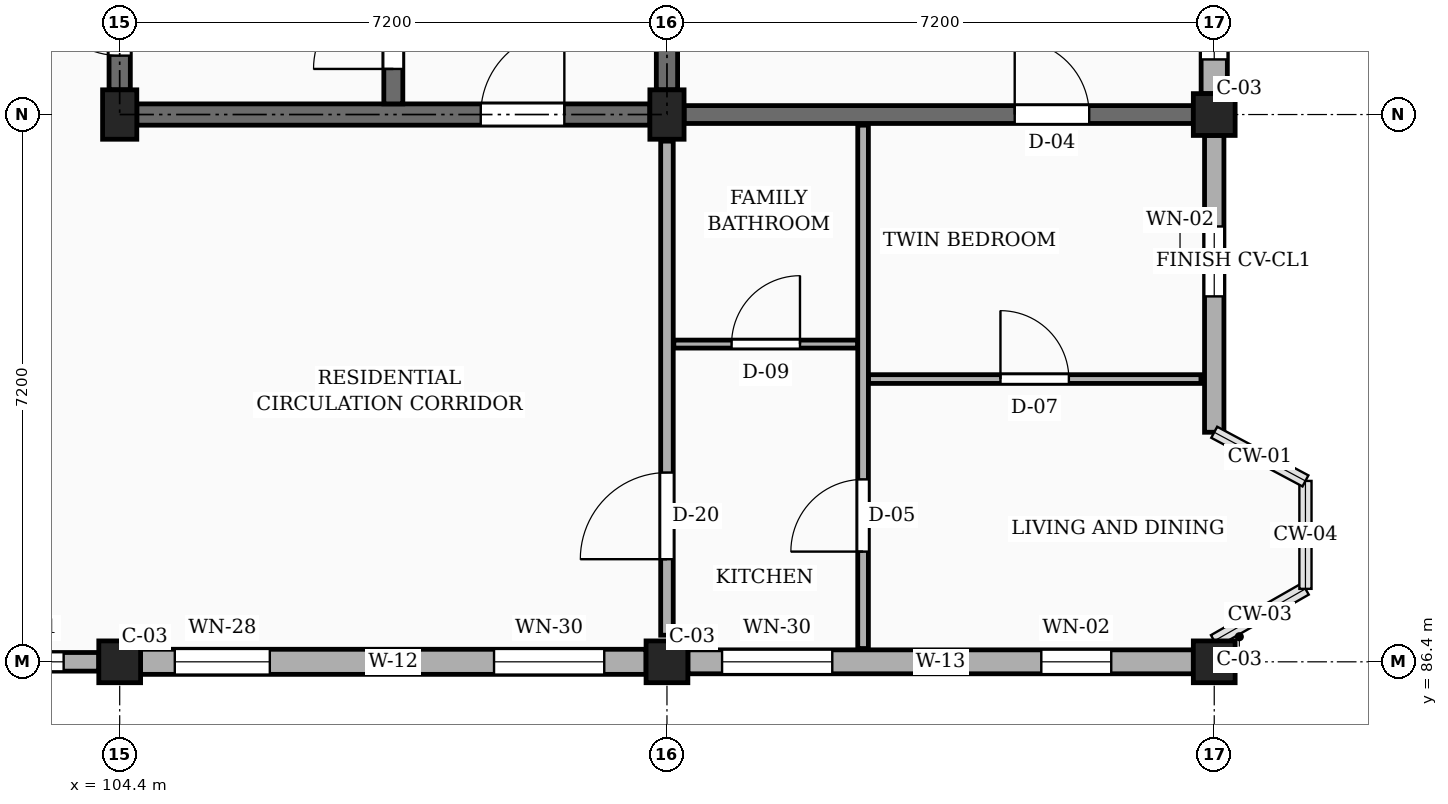
"""IFC4 building model, lengths in metres.
Left out: names, types, materials, properties, quantities, classifications, styles, units other than length and angle.
Written with IfcOpenShell. Run it as: python <this file> out.ifc"""

import sys

from ifc_helpers import new_model, si_unit, direction, frame, frame_2d, origin, origin_2d, place, context, subcontext, project, spatial, rectangle, extrude, element, fill, save


model = new_model("IFC4")
c1 = context("Model", 3, precision=1e-05, world=origin(), true_north=direction((0.0, 1.0)))
c2 = subcontext(c1, "Body", "Model", "MODEL_VIEW")
j1 = project(units=[si_unit("LENGTHUNIT", "METRE"), si_unit("PLANEANGLEUNIT", "RADIAN")], contexts=[c1])
p1 = place(None, origin())
s1 = spatial("IfcSite", under=j1, at=p1, CompositionType="ELEMENT")
p2 = place(p1, origin())
s2 = spatial("IfcBuilding", under=s1, at=p2, CompositionType="ELEMENT")
p3 = place(p2, frame((0.0, 0.0, 17.1)))
s3 = spatial("IfcBuildingStorey", under=s2, at=p3, CompositionType="ELEMENT", Elevation=17.1)
p4 = place(p3, frame((104.4, 86.4, 0.0), z_axis=(0.0, 0.0, 1.0), x_axis=(1.0, 0.0, 0.0)))
e1 = element("IfcColumn", 1, at=p4, inside=s3, PredefinedType="COLUMN", context=c2, shape_type="SweptSolid", body=[
    extrude(rectangle(XDim=0.55, YDim=0.55, at=origin_2d()), origin(), (0.0, 0.0, 1.0), 3.15),
])
p5 = place(p3, frame((104.4, 93.6, 0.0), z_axis=(0.0, 0.0, 1.0), x_axis=(1.0, 0.0, 0.0)))
e2 = element("IfcColumn", 2, at=p5, inside=s3, PredefinedType="COLUMN", context=c2, shape_type="SweptSolid", body=[
    extrude(rectangle(XDim=0.45, YDim=0.65, at=origin_2d()), origin(), (0.0, 0.0, 1.0), 3.15),
])
p6 = place(p3, frame((111.6, 86.4, 0.0), z_axis=(0.0, 0.0, 1.0), x_axis=(1.0, 0.0, 0.0)))
e3 = element("IfcColumn", 3, at=p6, inside=s3, PredefinedType="COLUMN", context=c2, shape_type="SweptSolid", body=[
    extrude(rectangle(XDim=0.55, YDim=0.55, at=origin_2d()), origin(), (0.0, 0.0, 1.0), 3.15),
])
p7 = place(p3, frame((111.6, 93.6, 0.0), z_axis=(0.0, 0.0, 1.0), x_axis=(1.0, 0.0, 0.0)))
e4 = element("IfcColumn", 4, at=p7, inside=s3, PredefinedType="COLUMN", context=c2, shape_type="SweptSolid", body=[
    extrude(rectangle(XDim=0.45, YDim=0.65, at=origin_2d()), origin(), (0.0, 0.0, 1.0), 3.15),
])
for number, where, z_axis, x_axis in (
    (5, (118.8, 86.4, 0.0), (0.0, 0.0, 1.0), (1.0, 0.0, 0.0)),
    (6, (118.8, 93.6, 0.0), (0.0, 0.0, 1.0), (1.0, 0.0, 0.0)),
):
    element("IfcColumn", number, at=place(p3, frame(where, z_axis=z_axis, x_axis=x_axis)), inside=s3, PredefinedType="COLUMN", context=c2, shape_type="SweptSolid", body=[
        extrude(rectangle(XDim=0.55, YDim=0.55, at=origin_2d()), origin(), (0.0, 0.0, 1.0), 3.15),
    ])
p8 = place(p3, frame((111.825, 93.6, 0.0), z_axis=(0.0, 0.0, 1.0), x_axis=(1.0, 0.0, 0.0)))
e7 = element("IfcWall", 7, at=p8, inside=s3, PredefinedType="SOLIDWALL", context=c2, shape_type="SweptSolid", body=[
    extrude(rectangle(XDim=6.7, YDim=0.235, at=frame_2d((3.35, 0.0))), origin(), (0.0, 0.0, 1.0), 2.19),
])
p9 = place(p8, frame((4.35, 0.0, 0.0)))
e8 = element("IfcOpeningElement", 8, at=p9, cuts=e7, PredefinedType="OPENING", context=c2, shape_type="SweptSolid", body=[
    extrude(rectangle(XDim=0.98, YDim=2.12, at=frame_2d((0.49, 1.06))), frame((0.0, 0.127, 0.0), z_axis=(0.0, -1.0, 0.0), x_axis=(1.0, 0.0, 0.0)), (0.0, 0.0, 1.0), 0.255),
])
p10 = place(p3, frame((97.475, 86.4, 0.0), z_axis=(0.0, 0.0, 1.0), x_axis=(1.0, 0.0, 0.0)))
e9 = element("IfcWall", 9, at=p10, inside=s3, PredefinedType="SOLIDWALL", context=c2, shape_type="SweptSolid", body=[
    extrude(rectangle(XDim=6.65, YDim=0.245, at=frame_2d((3.325, 0.0))), origin(), (0.0, 0.0, 1.0), 2.46),
])
p11 = place(p10, frame((0.423, 0.0, 0.78)))
e10 = element("IfcOpeningElement", 10, at=p11, cuts=e9, PredefinedType="OPENING", context=c2, shape_type="SweptSolid", body=[
    extrude(rectangle(XDim=0.94, YDim=1.44, at=frame_2d((0.47, 0.72))), frame((0.0, 0.133, 0.0), z_axis=(0.0, -1.0, 0.0), x_axis=(1.0, 0.0, 0.0)), (0.0, 0.0, 1.0), 0.265),
])
p12 = place(p10, frame((2.66, 0.0, 0.78)))
e11 = element("IfcOpeningElement", 11, at=p12, cuts=e9, PredefinedType="OPENING", context=c2, shape_type="SweptSolid", body=[
    extrude(rectangle(XDim=1.15, YDim=1.44, at=frame_2d((0.575, 0.72))), frame((0.0, 0.133, 0.0), z_axis=(0.0, -1.0, 0.0), x_axis=(1.0, 0.0, 0.0)), (0.0, 0.0, 1.0), 0.265),
])
p13 = place(p10, frame((5.147, 0.0, 0.78)))
e12 = element("IfcOpeningElement", 12, at=p13, cuts=e9, PredefinedType="OPENING", context=c2, shape_type="SweptSolid", body=[
    extrude(rectangle(XDim=1.04, YDim=1.26, at=frame_2d((0.52, 0.63))), frame((0.0, 0.133, 0.0), z_axis=(0.0, -1.0, 0.0), x_axis=(1.0, 0.0, 0.0)), (0.0, 0.0, 1.0), 0.265),
])
p14 = place(p3, frame((104.675, 86.4, 0.0), z_axis=(0.0, 0.0, 1.0), x_axis=(1.0, 0.0, 0.0)))
e13 = element("IfcWall", 13, at=p14, inside=s3, PredefinedType="SOLIDWALL", context=c2, shape_type="SweptSolid", body=[
    extrude(rectangle(XDim=6.65, YDim=0.33, at=frame_2d((3.325, 0.0))), origin(), (0.0, 0.0, 1.0), 2.46),
])
p15 = place(p14, frame((0.45, 0.0, 0.78)))
e14 = element("IfcOpeningElement", 14, at=p15, cuts=e13, PredefinedType="OPENING", context=c2, shape_type="SweptSolid", body=[
    extrude(rectangle(XDim=1.25, YDim=1.44, at=frame_2d((0.625, 0.72))), frame((0.0, 0.175, 0.0), z_axis=(0.0, -1.0, 0.0), x_axis=(1.0, 0.0, 0.0)), (0.0, 0.0, 1.0), 0.35),
])
p16 = place(p14, frame((4.65, 0.0, 0.78)))
e15 = element("IfcOpeningElement", 15, at=p16, cuts=e13, PredefinedType="OPENING", context=c2, shape_type="SweptSolid", body=[
    extrude(rectangle(XDim=1.45, YDim=1.44, at=frame_2d((0.725, 0.72))), frame((0.0, 0.175, 0.0), z_axis=(0.0, -1.0, 0.0), x_axis=(1.0, 0.0, 0.0)), (0.0, 0.0, 1.0), 0.35),
])
p17 = place(p3, frame((111.875, 86.4, 0.0), z_axis=(0.0, 0.0, 1.0), x_axis=(1.0, 0.0, 0.0)))
e16 = element("IfcWall", 16, at=p17, inside=s3, PredefinedType="SOLIDWALL", context=c2, shape_type="SweptSolid", body=[
    extrude(rectangle(XDim=6.65, YDim=0.315, at=frame_2d((3.325, 0.0))), origin(), (0.0, 0.0, 1.0), 2.46),
])
p18 = place(p17, frame((0.45, 0.0, 0.78)))
e17 = element("IfcOpeningElement", 17, at=p18, cuts=e16, PredefinedType="OPENING", context=c2, shape_type="SweptSolid", body=[
    extrude(rectangle(XDim=1.45, YDim=1.44, at=frame_2d((0.725, 0.72))), frame((0.0, 0.167, 0.0), z_axis=(0.0, -1.0, 0.0), x_axis=(1.0, 0.0, 0.0)), (0.0, 0.0, 1.0), 0.335),
])
p19 = place(p17, frame((4.65, 0.0, 0.78)))
e18 = element("IfcOpeningElement", 18, at=p19, cuts=e16, PredefinedType="OPENING", context=c2, shape_type="SweptSolid", body=[
    extrude(rectangle(XDim=0.92, YDim=1.15, at=frame_2d((0.46, 0.575))), frame((0.0, 0.167, 0.0), z_axis=(0.0, -1.0, 0.0), x_axis=(1.0, 0.0, 0.0)), (0.0, 0.0, 1.0), 0.335),
])
p20 = place(p3, frame((118.8, 89.42, 0.0), z_axis=(0.0, 0.0, 1.0), x_axis=(0.0, 1.0, 0.0)))
e19 = element("IfcWall", 19, at=p20, inside=s3, PredefinedType="SOLIDWALL", context=c2, shape_type="SweptSolid", body=[
    extrude(rectangle(XDim=3.905, YDim=0.255, at=frame_2d((1.953, 0.0))), origin(), (0.0, 0.0, 1.0), 2.46),
])
p21 = place(p20, frame((1.788, 0.0, 0.78)))
e20 = element("IfcOpeningElement", 20, at=p21, cuts=e19, PredefinedType="OPENING", context=c2, shape_type="SweptSolid", body=[
    extrude(rectangle(XDim=0.92, YDim=1.15, at=frame_2d((0.46, 0.575))), frame((0.0, 0.137, 0.0), z_axis=(0.0, -1.0, 0.0), x_axis=(1.0, 0.0, 0.0)), (0.0, 0.0, 1.0), 0.275),
])
p22 = place(p3, frame((118.8, 93.875, 0.0), z_axis=(0.0, 0.0, 1.0), x_axis=(0.0, 1.0, 0.0)))
e21 = element("IfcWall", 21, at=p22, inside=s3, PredefinedType="SOLIDWALL", context=c2, shape_type="SweptSolid", body=[
    extrude(rectangle(XDim=6.65, YDim=0.345, at=frame_2d((3.325, 0.0))), origin(), (0.0, 0.0, 1.0), 2.46),
])
p23 = place(p22, frame((0.45, 0.0, 0.78)))
e22 = element("IfcOpeningElement", 22, at=p23, cuts=e21, PredefinedType="OPENING", context=c2, shape_type="SweptSolid", body=[
    extrude(rectangle(XDim=1.0, YDim=1.15, at=frame_2d((0.5, 0.575))), frame((0.0, 0.183, 0.0), z_axis=(0.0, -1.0, 0.0), x_axis=(1.0, 0.0, 0.0)), (0.0, 0.0, 1.0), 0.365),
])
p24 = place(p22, frame((4.65, 0.0, 0.78)))
e23 = element("IfcOpeningElement", 23, at=p24, cuts=e21, PredefinedType="OPENING", context=c2, shape_type="SweptSolid", body=[
    extrude(rectangle(XDim=1.16, YDim=1.15, at=frame_2d((0.58, 0.575))), frame((0.0, 0.183, 0.0), z_axis=(0.0, -1.0, 0.0), x_axis=(1.0, 0.0, 0.0)), (0.0, 0.0, 1.0), 0.365),
])
p25 = place(p3, frame((104.4, 93.925, 0.0), z_axis=(0.0, 0.0, 1.0), x_axis=(0.0, 1.0, 0.0)))
e24 = element("IfcWall", 24, at=p25, inside=s3, PredefinedType="SHEAR", context=c2, shape_type="SweptSolid", body=[
    extrude(rectangle(XDim=6.55, YDim=0.28, at=frame_2d((3.275, 0.0))), origin(), (0.0, 0.0, 1.0), 2.89),
])
p26 = place(p25, frame((0.45, 0.0, 0.0)))
e25 = element("IfcOpeningElement", 25, at=p26, cuts=e24, PredefinedType="OPENING", context=c2, shape_type="SweptSolid", body=[
    extrude(rectangle(XDim=1.05, YDim=2.15, at=frame_2d((0.525, 1.075))), frame((0.0, 0.15, 0.0), z_axis=(0.0, -1.0, 0.0), x_axis=(1.0, 0.0, 0.0)), (0.0, 0.0, 1.0), 0.3),
])
p27 = place(p3, frame((111.6, 93.925, 0.0), z_axis=(0.0, 0.0, 1.0), x_axis=(0.0, 1.0, 0.0)))
e26 = element("IfcWall", 26, at=p27, inside=s3, PredefinedType="SHEAR", context=c2, shape_type="SweptSolid", body=[
    extrude(rectangle(XDim=6.55, YDim=0.28, at=frame_2d((3.275, 0.0))), origin(), (0.0, 0.0, 1.0), 2.89),
])
p28 = place(p3, frame((104.625, 93.6, 0.0), z_axis=(0.0, 0.0, 1.0), x_axis=(1.0, 0.0, 0.0)))
e27 = element("IfcWall", 27, at=p28, inside=s3, PredefinedType="SHEAR", context=c2, shape_type="SweptSolid", body=[
    extrude(rectangle(XDim=6.75, YDim=0.28, at=frame_2d((3.375, 0.0))), origin(), (0.0, 0.0, 1.0), 2.89),
])
p29 = place(p28, frame((4.525, 0.0, 0.0)))
e28 = element("IfcOpeningElement", 28, at=p29, cuts=e27, PredefinedType="OPENING", context=c2, shape_type="SweptSolid", body=[
    extrude(rectangle(XDim=1.1, YDim=2.15, at=frame_2d((0.55, 1.075))), frame((0.0, 0.15, 0.0), z_axis=(0.0, -1.0, 0.0), x_axis=(1.0, 0.0, 0.0)), (0.0, 0.0, 1.0), 0.3),
])
p30 = place(p3, frame((108.0, 93.74, 0.0), z_axis=(0.0, 0.0, 1.0), x_axis=(0.0, 1.0, 0.0)))
e29 = element("IfcWall", 29, at=p30, inside=s3, PredefinedType="SHEAR", context=c2, shape_type="SweptSolid", body=[
    extrude(rectangle(XDim=6.92, YDim=0.25, at=frame_2d((3.46, 0.0))), origin(), (0.0, 0.0, 1.0), 2.89),
])
p31 = place(p30, frame((0.46, 0.0, 0.0)))
e30 = element("IfcOpeningElement", 30, at=p31, cuts=e29, PredefinedType="OPENING", context=c2, shape_type="SweptSolid", body=[
    extrude(rectangle(XDim=1.05, YDim=2.15, at=frame_2d((0.525, 1.075))), frame((0.0, 0.135, 0.0), z_axis=(0.0, -1.0, 0.0), x_axis=(1.0, 0.0, 0.0)), (0.0, 0.0, 1.0), 0.27),
])
p32 = place(p3, frame((111.6, 86.75, 0.0), z_axis=(0.0, 0.0, 1.0), x_axis=(0.0, 1.0, 0.0)))
e31 = element("IfcWall", 31, at=p32, inside=s3, PredefinedType="PARTITIONING", context=c2, shape_type="SweptSolid", body=[
    extrude(rectangle(XDim=6.5, YDim=0.165, at=frame_2d((3.25, 0.0))), origin(), (0.0, 0.0, 1.0), 2.325),
])
p33 = place(p32, frame((1.0, 0.0, 0.0)))
e32 = element("IfcOpeningElement", 32, at=p33, cuts=e31, PredefinedType="OPENING", context=c2, shape_type="SweptSolid", body=[
    extrude(rectangle(XDim=1.14, YDim=2.18, at=frame_2d((0.57, 1.09))), frame((0.0, 0.093, 0.0), z_axis=(0.0, -1.0, 0.0), x_axis=(1.0, 0.0, 0.0)), (0.0, 0.0, 1.0), 0.185),
])
p34 = place(p3, frame((114.25, 90.12, 0.0), z_axis=(0.0, 0.0, 1.0), x_axis=(1.0, 0.0, 0.0)))
e33 = element("IfcWall", 33, at=p34, inside=s3, PredefinedType="PARTITIONING", context=c2, shape_type="SweptSolid", body=[
    extrude(rectangle(XDim=4.375, YDim=0.115, at=frame_2d((2.188, 0.0))), origin(), (0.0, 0.0, 1.0), 2.325),
])
p35 = place(p34, frame((1.738, 0.0, 0.0)))
e34 = element("IfcOpeningElement", 34, at=p35, cuts=e33, PredefinedType="OPENING", context=c2, shape_type="SweptSolid", body=[
    extrude(rectangle(XDim=0.9, YDim=2.1, at=frame_2d((0.45, 1.05))), frame((0.0, 0.067, 0.0), z_axis=(0.0, -1.0, 0.0), x_axis=(1.0, 0.0, 0.0)), (0.0, 0.0, 1.0), 0.135),
])
p36 = place(p3, frame((111.69, 90.58, 0.0), z_axis=(0.0, 0.0, 1.0), x_axis=(1.0, 0.0, 0.0)))
e35 = element("IfcWall", 35, at=p36, inside=s3, PredefinedType="PARTITIONING", context=c2, shape_type="SweptSolid", body=[
    extrude(rectangle(XDim=2.42, YDim=0.105, at=frame_2d((1.21, 0.0))), origin(), (0.0, 0.0, 1.0), 2.325),
])
p37 = place(p36, frame((0.76, 0.0, 0.0)))
e36 = element("IfcOpeningElement", 36, at=p37, cuts=e35, PredefinedType="OPENING", context=c2, shape_type="SweptSolid", body=[
    extrude(rectangle(XDim=0.9, YDim=2.05, at=frame_2d((0.45, 1.025))), frame((0.0, 0.062, 0.0), z_axis=(0.0, -1.0, 0.0), x_axis=(1.0, 0.0, 0.0)), (0.0, 0.0, 1.0), 0.125),
])
p38 = place(p3, frame((114.18, 86.575, 0.0), z_axis=(0.0, 0.0, 1.0), x_axis=(0.0, 1.0, 0.0)))
e37 = element("IfcWall", 37, at=p38, inside=s3, PredefinedType="PARTITIONING", context=c2, shape_type="SweptSolid", body=[
    extrude(rectangle(XDim=6.885, YDim=0.14, at=frame_2d((3.442, 0.0))), origin(), (0.0, 0.0, 1.0), 2.325),
])
p39 = place(p38, frame((1.275, 0.0, 0.0)))
e38 = element("IfcOpeningElement", 38, at=p39, cuts=e37, PredefinedType="OPENING", context=c2, shape_type="SweptSolid", body=[
    extrude(rectangle(XDim=0.95, YDim=2.1, at=frame_2d((0.475, 1.05))), frame((0.0, 0.08, 0.0), z_axis=(0.0, -1.0, 0.0), x_axis=(1.0, 0.0, 0.0)), (0.0, 0.0, 1.0), 0.16),
])
p40 = place(p13, origin())
e39 = element("IfcWindow", 39, at=p40, inside=s3, PartitioningType="SINGLE_PANEL", PredefinedType="WINDOW", context=c2, shape_type="SweptSolid", body=[
    extrude(rectangle(XDim=1.04, YDim=1.26, at=frame_2d((0.52, 0.63))), frame((0.0, 0.03, 0.0), z_axis=(0.0, -1.0, 0.0), x_axis=(1.0, 0.0, 0.0)), (0.0, 0.0, 1.0), 0.06),
])
fill(e12, e39)
p41 = place(p15, origin())
e40 = element("IfcWindow", 40, at=p41, inside=s3, PartitioningType="SINGLE_PANEL", PredefinedType="WINDOW", context=c2, shape_type="SweptSolid", body=[
    extrude(rectangle(XDim=1.25, YDim=1.44, at=frame_2d((0.625, 0.72))), frame((0.0, 0.03, 0.0), z_axis=(0.0, -1.0, 0.0), x_axis=(1.0, 0.0, 0.0)), (0.0, 0.0, 1.0), 0.06),
])
fill(e14, e40)
p42 = place(p16, origin())
e41 = element("IfcWindow", 41, at=p42, inside=s3, PartitioningType="SINGLE_PANEL", PredefinedType="WINDOW", context=c2, shape_type="SweptSolid", body=[
    extrude(rectangle(XDim=1.45, YDim=1.44, at=frame_2d((0.725, 0.72))), frame((0.0, 0.03, 0.0), z_axis=(0.0, -1.0, 0.0), x_axis=(1.0, 0.0, 0.0)), (0.0, 0.0, 1.0), 0.06),
])
fill(e15, e41)
p43 = place(p18, origin())
e42 = element("IfcWindow", 42, at=p43, inside=s3, PartitioningType="SINGLE_PANEL", PredefinedType="WINDOW", context=c2, shape_type="SweptSolid", body=[
    extrude(rectangle(XDim=1.45, YDim=1.44, at=frame_2d((0.725, 0.72))), frame((0.0, 0.03, 0.0), z_axis=(0.0, -1.0, 0.0), x_axis=(1.0, 0.0, 0.0)), (0.0, 0.0, 1.0), 0.06),
])
fill(e17, e42)
p44 = place(p19, origin())
e43 = element("IfcWindow", 43, at=p44, inside=s3, PartitioningType="SINGLE_PANEL", PredefinedType="WINDOW", context=c2, shape_type="SweptSolid", body=[
    extrude(rectangle(XDim=0.92, YDim=1.15, at=frame_2d((0.46, 0.575))), frame((0.0, 0.03, 0.0), z_axis=(0.0, -1.0, 0.0), x_axis=(1.0, 0.0, 0.0)), (0.0, 0.0, 1.0), 0.06),
])
fill(e18, e43)
p45 = place(p21, origin())
e44 = element("IfcWindow", 44, at=p45, inside=s3, PartitioningType="SINGLE_PANEL", PredefinedType="WINDOW", context=c2, shape_type="SweptSolid", body=[
    extrude(rectangle(XDim=0.92, YDim=1.15, at=frame_2d((0.46, 0.575))), frame((0.0, 0.03, 0.0), z_axis=(0.0, -1.0, 0.0), x_axis=(1.0, 0.0, 0.0)), (0.0, 0.0, 1.0), 0.06),
])
fill(e20, e44)
p46 = place(p23, origin())
e45 = element("IfcWindow", 45, at=p46, inside=s3, PartitioningType="SINGLE_PANEL", PredefinedType="WINDOW", context=c2, shape_type="SweptSolid", body=[
    extrude(rectangle(XDim=1.0, YDim=1.15, at=frame_2d((0.5, 0.575))), frame((0.0, 0.03, 0.0), z_axis=(0.0, -1.0, 0.0), x_axis=(1.0, 0.0, 0.0)), (0.0, 0.0, 1.0), 0.06),
])
fill(e22, e45)
p47 = place(p26, origin())
e46 = element("IfcDoor", 46, at=p47, inside=s3, OperationType="SINGLE_SWING_RIGHT", PredefinedType="DOOR", context=c2, shape_type="SweptSolid", body=[
    extrude(rectangle(XDim=1.05, YDim=2.15, at=frame_2d((0.525, 1.075))), frame((0.0, 0.025, 0.0), z_axis=(0.0, -1.0, 0.0), x_axis=(1.0, 0.0, 0.0)), (0.0, 0.0, 1.0), 0.05),
])
fill(e25, e46)
p48 = place(p29, frame((1.1, 0.0, 0.0), z_axis=(0.0, 0.0, 1.0), x_axis=(-1.0, 0.0, 0.0)))
e47 = element("IfcDoor", 47, at=p48, inside=s3, OperationType="SINGLE_SWING_RIGHT", PredefinedType="DOOR", context=c2, shape_type="SweptSolid", body=[
    extrude(rectangle(XDim=1.1, YDim=2.15, at=frame_2d((0.55, 1.075))), frame((0.0, 0.025, 0.0), z_axis=(0.0, -1.0, 0.0), x_axis=(1.0, 0.0, 0.0)), (0.0, 0.0, 1.0), 0.05),
])
fill(e28, e47)
p49 = place(p31, origin())
e48 = element("IfcDoor", 48, at=p49, inside=s3, OperationType="SINGLE_SWING_LEFT", PredefinedType="DOOR", context=c2, shape_type="SweptSolid", body=[
    extrude(rectangle(XDim=1.05, YDim=2.15, at=frame_2d((0.525, 1.075))), frame((0.0, 0.025, 0.0), z_axis=(0.0, -1.0, 0.0), x_axis=(1.0, 0.0, 0.0)), (0.0, 0.0, 1.0), 0.05),
])
fill(e30, e48)
p50 = place(p33, origin())
e49 = element("IfcDoor", 49, at=p50, inside=s3, OperationType="SINGLE_SWING_LEFT", PredefinedType="DOOR", context=c2, shape_type="SweptSolid", body=[
    extrude(rectangle(XDim=1.14, YDim=2.18, at=frame_2d((0.57, 1.09))), frame((0.0, 0.025, 0.0), z_axis=(0.0, -1.0, 0.0), x_axis=(1.0, 0.0, 0.0)), (0.0, 0.0, 1.0), 0.05),
])
fill(e32, e49)
p51 = place(p35, origin())
e50 = element("IfcDoor", 50, at=p51, inside=s3, OperationType="SINGLE_SWING_LEFT", PredefinedType="DOOR", context=c2, shape_type="SweptSolid", body=[
    extrude(rectangle(XDim=0.9, YDim=2.1, at=frame_2d((0.45, 1.05))), frame((0.0, 0.025, 0.0), z_axis=(0.0, -1.0, 0.0), x_axis=(1.0, 0.0, 0.0)), (0.0, 0.0, 1.0), 0.05),
])
fill(e34, e50)
p52 = place(p37, origin())
e51 = element("IfcDoor", 51, at=p52, inside=s3, OperationType="SINGLE_SWING_RIGHT", PredefinedType="DOOR", context=c2, shape_type="SweptSolid", body=[
    extrude(rectangle(XDim=0.9, YDim=2.05, at=frame_2d((0.45, 1.025))), frame((0.0, 0.025, 0.0), z_axis=(0.0, -1.0, 0.0), x_axis=(1.0, 0.0, 0.0)), (0.0, 0.0, 1.0), 0.05),
])
fill(e36, e51)
p53 = place(p39, origin())
e52 = element("IfcDoor", 52, at=p53, inside=s3, OperationType="SINGLE_SWING_LEFT", PredefinedType="DOOR", context=c2, shape_type="SweptSolid", body=[
    extrude(rectangle(XDim=0.95, YDim=2.1, at=frame_2d((0.475, 1.05))), frame((0.0, 0.025, 0.0), z_axis=(0.0, -1.0, 0.0), x_axis=(1.0, 0.0, 0.0)), (0.0, 0.0, 1.0), 0.05),
])
fill(e38, e52)
p54 = place(p9, origin())
e53 = element("IfcDoor", 53, at=p54, inside=s3, OperationType="SINGLE_SWING_LEFT", PredefinedType="DOOR", context=c2, shape_type="SweptSolid", body=[
    extrude(rectangle(XDim=0.98, YDim=2.12, at=frame_2d((0.49, 1.06))), frame((0.0, 0.025, 0.0), z_axis=(0.0, -1.0, 0.0), x_axis=(1.0, 0.0, 0.0)), (0.0, 0.0, 1.0), 0.05),
])
fill(e8, e53)
save(model, sys.argv[1])
